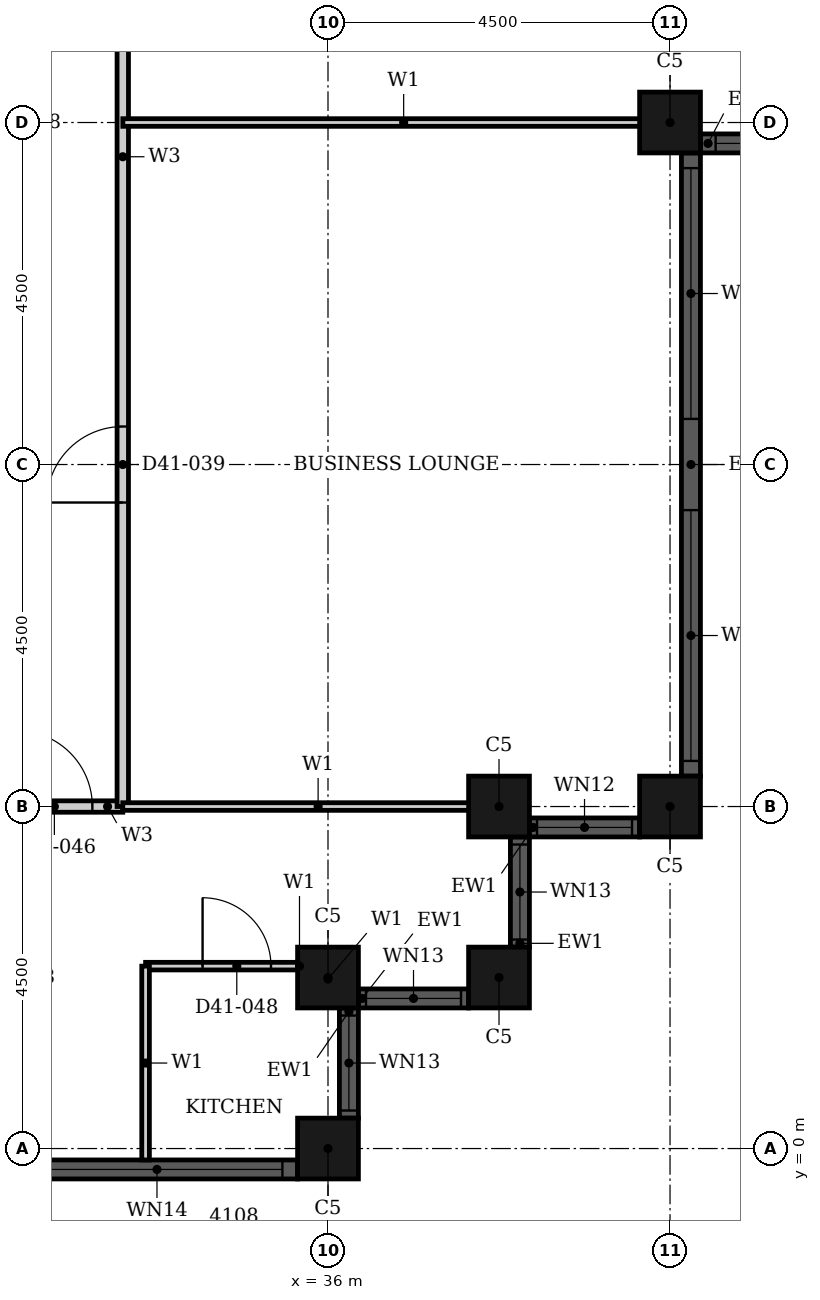
"""IFC4 building model, lengths in metres.
Left out: names, types, materials, properties, quantities, classifications, styles, units other than length and angle.
Written with IfcOpenShell. Run it as: python <this file> out.ifc"""

import sys

from ifc_helpers import new_model, si_unit, direction, frame, frame_2d, origin, origin_2d, place, context, subcontext, project, spatial, rectangle, hollow_rectangle, extrude, element, fill, save


model = new_model("IFC4")
c1 = context("Model", 3, precision=1e-05, world=origin(), true_north=direction((0.0, 1.0)))
c2 = subcontext(c1, "Body", "Model", "MODEL_VIEW")
j1 = project(units=[si_unit("LENGTHUNIT", "METRE"), si_unit("PLANEANGLEUNIT", "RADIAN")], contexts=[c1])
p1 = place(None, origin())
s1 = spatial("IfcSite", under=j1, at=p1, CompositionType="ELEMENT")
p2 = place(p1, origin())
s2 = spatial("IfcBuilding", under=s1, at=p2, CompositionType="ELEMENT")
p3 = place(p2, frame((0.0, 0.0, 165.4)))
s3 = spatial("IfcBuildingStorey", under=s2, at=p3, CompositionType="ELEMENT", Elevation=165.4)
for number, where, z_axis, x_axis in (
    (1, (36.0, 0.0, 0.0), (0.0, 0.0, 1.0), (1.0, 0.0, 0.0)),
    (2, (36.0, 2.25, 0.0), (0.0, 0.0, 1.0), (1.0, 0.0, 0.0)),
    (3, (38.25, 2.25, 0.0), (0.0, 0.0, 1.0), (1.0, 0.0, 0.0)),
    (4, (38.25, 4.5, 0.0), (0.0, 0.0, 1.0), (1.0, 0.0, 0.0)),
    (5, (40.5, 4.5, 0.0), (0.0, 0.0, 1.0), (1.0, 0.0, 0.0)),
    (6, (40.5, 13.5, 0.0), (0.0, 0.0, 1.0), (1.0, 0.0, 0.0)),
):
    element("IfcColumn", number, at=place(p3, frame(where, z_axis=z_axis, x_axis=x_axis)), inside=s3, PredefinedType="COLUMN", context=c2, shape_type="SweptSolid", body=[
        extrude(hollow_rectangle(XDim=0.8, YDim=0.8, WallThickness=0.025, at=origin_2d()), origin(), (0.0, 0.0, 1.0), 3.7),
    ])
p4 = place(p3, frame((27.4, -0.275, 0.0), z_axis=(0.0, 0.0, 1.0), x_axis=(1.0, 0.0, 0.0)))
e7 = element("IfcWall", 7, at=p4, inside=s3, PredefinedType="SOLIDWALL", context=c2, shape_type="SweptSolid", body=[
    extrude(rectangle(XDim=8.2, YDim=0.25, at=frame_2d((4.1, 0.0))), origin(), (0.0, 0.0, 1.0), 3.7),
])
p5 = place(p4, frame((0.2, 0.0, 0.45)))
e8 = element("IfcOpeningElement", 8, at=p5, cuts=e7, PredefinedType="OPENING", context=c2, shape_type="SweptSolid", body=[
    extrude(rectangle(XDim=3.3, YDim=2.53, at=frame_2d((1.65, 1.265))), frame((0.0, 0.135, 0.0), z_axis=(0.0, -1.0, 0.0), x_axis=(1.0, 0.0, 0.0)), (0.0, 0.0, 1.0), 0.27),
])
p6 = place(p4, frame((4.7, 0.0, 0.45)))
e9 = element("IfcOpeningElement", 9, at=p6, cuts=e7, PredefinedType="OPENING", context=c2, shape_type="SweptSolid", body=[
    extrude(rectangle(XDim=3.3, YDim=2.53, at=frame_2d((1.65, 1.265))), frame((0.0, 0.135, 0.0), z_axis=(0.0, -1.0, 0.0), x_axis=(1.0, 0.0, 0.0)), (0.0, 0.0, 1.0), 0.27),
])
p7 = place(p3, frame((36.275, 0.4, 0.0), z_axis=(0.0, 0.0, 1.0), x_axis=(0.0, 1.0, 0.0)))
e10 = element("IfcWall", 10, at=p7, inside=s3, PredefinedType="SOLIDWALL", context=c2, shape_type="SweptSolid", body=[
    extrude(rectangle(XDim=1.45, YDim=0.25, at=frame_2d((0.725, 0.0))), origin(), (0.0, 0.0, 1.0), 3.7),
])
p8 = place(p7, frame((0.1, 0.0, 0.9)))
e11 = element("IfcOpeningElement", 11, at=p8, cuts=e10, PredefinedType="OPENING", context=c2, shape_type="SweptSolid", body=[
    extrude(rectangle(XDim=1.25, YDim=1.85, at=frame_2d((0.625, 0.925))), frame((0.0, 0.135, 0.0), z_axis=(0.0, -1.0, 0.0), x_axis=(1.0, 0.0, 0.0)), (0.0, 0.0, 1.0), 0.27),
])
p9 = place(p3, frame((36.4, 1.975, 0.0), z_axis=(0.0, 0.0, 1.0), x_axis=(1.0, 0.0, 0.0)))
e12 = element("IfcWall", 12, at=p9, inside=s3, PredefinedType="SOLIDWALL", context=c2, shape_type="SweptSolid", body=[
    extrude(rectangle(XDim=1.45, YDim=0.25, at=frame_2d((0.725, 0.0))), origin(), (0.0, 0.0, 1.0), 3.7),
])
p10 = place(p9, frame((0.1, 0.0, 0.9)))
e13 = element("IfcOpeningElement", 13, at=p10, cuts=e12, PredefinedType="OPENING", context=c2, shape_type="SweptSolid", body=[
    extrude(rectangle(XDim=1.25, YDim=1.85, at=frame_2d((0.625, 0.925))), frame((0.0, 0.135, 0.0), z_axis=(0.0, -1.0, 0.0), x_axis=(1.0, 0.0, 0.0)), (0.0, 0.0, 1.0), 0.27),
])
p11 = place(p3, frame((38.525, 2.65, 0.0), z_axis=(0.0, 0.0, 1.0), x_axis=(0.0, 1.0, 0.0)))
e14 = element("IfcWall", 14, at=p11, inside=s3, PredefinedType="SOLIDWALL", context=c2, shape_type="SweptSolid", body=[
    extrude(rectangle(XDim=1.45, YDim=0.25, at=frame_2d((0.725, 0.0))), origin(), (0.0, 0.0, 1.0), 3.7),
])
p12 = place(p11, frame((0.1, 0.0, 0.9)))
e15 = element("IfcOpeningElement", 15, at=p12, cuts=e14, PredefinedType="OPENING", context=c2, shape_type="SweptSolid", body=[
    extrude(rectangle(XDim=1.25, YDim=1.85, at=frame_2d((0.625, 0.925))), frame((0.0, 0.135, 0.0), z_axis=(0.0, -1.0, 0.0), x_axis=(1.0, 0.0, 0.0)), (0.0, 0.0, 1.0), 0.27),
])
p13 = place(p3, frame((38.65, 4.225, 0.0), z_axis=(0.0, 0.0, 1.0), x_axis=(1.0, 0.0, 0.0)))
e16 = element("IfcWall", 16, at=p13, inside=s3, PredefinedType="SOLIDWALL", context=c2, shape_type="SweptSolid", body=[
    extrude(rectangle(XDim=1.45, YDim=0.25, at=frame_2d((0.725, 0.0))), origin(), (0.0, 0.0, 1.0), 3.7),
])
p14 = place(p13, frame((0.1, 0.0, 0.9)))
e17 = element("IfcOpeningElement", 17, at=p14, cuts=e16, PredefinedType="OPENING", context=c2, shape_type="SweptSolid", body=[
    extrude(rectangle(XDim=1.25, YDim=2.08, at=frame_2d((0.625, 1.04))), frame((0.0, 0.135, 0.0), z_axis=(0.0, -1.0, 0.0), x_axis=(1.0, 0.0, 0.0)), (0.0, 0.0, 1.0), 0.27),
])
p15 = place(p3, frame((40.775, 4.9, 0.0), z_axis=(0.0, 0.0, 1.0), x_axis=(0.0, 1.0, 0.0)))
e18 = element("IfcWall", 18, at=p15, inside=s3, PredefinedType="SOLIDWALL", context=c2, shape_type="SweptSolid", body=[
    extrude(rectangle(XDim=8.2, YDim=0.25, at=frame_2d((4.1, 0.0))), origin(), (0.0, 0.0, 1.0), 3.7),
])
p16 = place(p15, frame((0.2, 0.0, 0.45)))
e19 = element("IfcOpeningElement", 19, at=p16, cuts=e18, PredefinedType="OPENING", context=c2, shape_type="SweptSolid", body=[
    extrude(rectangle(XDim=3.3, YDim=2.3, at=frame_2d((1.65, 1.15))), frame((0.0, 0.135, 0.0), z_axis=(0.0, -1.0, 0.0), x_axis=(1.0, 0.0, 0.0)), (0.0, 0.0, 1.0), 0.27),
])
p17 = place(p15, frame((4.7, 0.0, 0.45)))
e20 = element("IfcOpeningElement", 20, at=p17, cuts=e18, PredefinedType="OPENING", context=c2, shape_type="SweptSolid", body=[
    extrude(rectangle(XDim=3.3, YDim=2.3, at=frame_2d((1.65, 1.15))), frame((0.0, 0.135, 0.0), z_axis=(0.0, -1.0, 0.0), x_axis=(1.0, 0.0, 0.0)), (0.0, 0.0, 1.0), 0.27),
])
p18 = place(p3, frame((40.9, 13.225, 0.0), z_axis=(0.0, 0.0, 1.0), x_axis=(1.0, 0.0, 0.0)))
e21 = element("IfcWall", 21, at=p18, inside=s3, PredefinedType="SOLIDWALL", context=c2, shape_type="SweptSolid", body=[
    extrude(rectangle(XDim=3.7, YDim=0.25, at=frame_2d((1.85, 0.0))), origin(), (0.0, 0.0, 1.0), 3.7),
])
p19 = place(p18, frame((0.2, 0.0, 0.45)))
e22 = element("IfcOpeningElement", 22, at=p19, cuts=e21, PredefinedType="OPENING", context=c2, shape_type="SweptSolid", body=[
    extrude(rectangle(XDim=3.3, YDim=2.3, at=frame_2d((1.65, 1.15))), frame((0.0, 0.135, 0.0), z_axis=(0.0, -1.0, 0.0), x_axis=(1.0, 0.0, 0.0)), (0.0, 0.0, 1.0), 0.27),
])
p20 = place(p3, frame((31.5, 4.5, 0.0), z_axis=(0.0, 0.0, 1.0), x_axis=(1.0, 0.0, 0.0)))
e23 = element("IfcWall", 23, at=p20, inside=s3, PredefinedType="PARTITIONING", context=c2, shape_type="SweptSolid", body=[
    extrude(rectangle(XDim=1.8, YDim=0.15, at=frame_2d((0.9, 0.0))), origin(), (0.0, 0.0, 1.0), 3.4),
])
p21 = place(p20, frame((0.4, 0.0, 0.0)))
e24 = element("IfcOpeningElement", 24, at=p21, cuts=e23, PredefinedType="OPENING", context=c2, shape_type="SweptSolid", body=[
    extrude(rectangle(XDim=1.0, YDim=2.2, at=frame_2d((0.5, 1.1))), frame((0.0, 0.085, 0.0), z_axis=(0.0, -1.0, 0.0), x_axis=(1.0, 0.0, 0.0)), (0.0, 0.0, 1.0), 0.17),
])
p22 = place(p3, frame((33.3, 4.5, 0.0), z_axis=(0.0, 0.0, 1.0), x_axis=(0.0, 1.0, 0.0)))
e25 = element("IfcWall", 25, at=p22, inside=s3, PredefinedType="PARTITIONING", context=c2, shape_type="SweptSolid", body=[
    extrude(rectangle(XDim=16.199, YDim=0.15, at=frame_2d((8.1, 0.0))), origin(), (0.0, 0.0, 1.0), 3.4),
])
p23 = place(p22, frame((12.099, 0.0, 0.0)))
e26 = element("IfcOpeningElement", 26, at=p23, cuts=e25, PredefinedType="OPENING", context=c2, shape_type="SweptSolid", body=[
    extrude(rectangle(XDim=1.0, YDim=2.2, at=frame_2d((0.5, 1.1))), frame((0.0, 0.085, 0.0), z_axis=(0.0, -1.0, 0.0), x_axis=(1.0, 0.0, 0.0)), (0.0, 0.0, 1.0), 0.17),
])
p24 = place(p22, frame((4.0, 0.0, 0.0)))
e27 = element("IfcOpeningElement", 27, at=p24, cuts=e25, PredefinedType="OPENING", context=c2, shape_type="SweptSolid", body=[
    extrude(rectangle(XDim=1.0, YDim=2.1, at=frame_2d((0.5, 1.05))), frame((0.0, 0.085, 0.0), z_axis=(0.0, -1.0, 0.0), x_axis=(1.0, 0.0, 0.0)), (0.0, 0.0, 1.0), 0.17),
])
p25 = place(p3, frame((33.301, 13.5, 0.0), z_axis=(0.0, 0.0, 1.0), x_axis=(1.0, 0.0, 0.0)))
e28 = element("IfcWall", 28, at=p25, inside=s3, PredefinedType="PARTITIONING", context=c2, shape_type="SweptSolid", body=[
    extrude(rectangle(XDim=7.389, YDim=0.1, at=frame_2d((3.694, 0.0))), origin(), (0.0, 0.0, 1.0), 2.48),
])
p26 = place(p3, frame((33.6, 2.4, 0.0), z_axis=(0.0, 0.0, 1.0), x_axis=(1.0, 0.0, 0.0)))
e29 = element("IfcWall", 29, at=p26, inside=s3, PredefinedType="PARTITIONING", context=c2, shape_type="SweptSolid", body=[
    extrude(rectangle(XDim=2.4, YDim=0.1, at=frame_2d((1.2, 0.0))), origin(), (0.0, 0.0, 1.0), 3.4),
])
p27 = place(p26, frame((0.75, 0.0, 0.0)))
e30 = element("IfcOpeningElement", 30, at=p27, cuts=e29, PredefinedType="OPENING", context=c2, shape_type="SweptSolid", body=[
    extrude(rectangle(XDim=0.9, YDim=2.1, at=frame_2d((0.45, 1.05))), frame((0.0, 0.06, 0.0), z_axis=(0.0, -1.0, 0.0), x_axis=(1.0, 0.0, 0.0)), (0.0, 0.0, 1.0), 0.12),
])
p28 = place(p3, frame((33.3, 4.5, 0.0), z_axis=(0.0, 0.0, 1.0), x_axis=(1.0, 0.0, 0.0)))
e31 = element("IfcWall", 31, at=p28, inside=s3, PredefinedType="PARTITIONING", context=c2, shape_type="SweptSolid", body=[
    extrude(rectangle(XDim=5.14, YDim=0.1, at=frame_2d((2.57, 0.0))), origin(), (0.0, 0.0, 1.0), 3.4),
])
p29 = place(p3, frame((33.6, -0.15, 0.0), z_axis=(0.0, 0.0, 1.0), x_axis=(0.0, 1.0, 0.0)))
e32 = element("IfcWall", 32, at=p29, inside=s3, PredefinedType="PARTITIONING", context=c2, shape_type="SweptSolid", body=[
    extrude(rectangle(XDim=2.55, YDim=0.1, at=frame_2d((1.275, 0.0))), origin(), (0.0, 0.0, 1.0), 3.4),
])
p30 = place(p3, frame((36.0, 2.06, 0.0), z_axis=(0.0, 0.0, 1.0), x_axis=(0.0, 1.0, 0.0)))
e33 = element("IfcWall", 33, at=p30, inside=s3, PredefinedType="PARTITIONING", context=c2, shape_type="SweptSolid", body=[
    extrude(rectangle(XDim=0.34, YDim=0.1, at=frame_2d((0.17, 0.0))), origin(), (0.0, 0.0, 1.0), 3.4),
])
p31 = place(p6, origin())
e34 = element("IfcWindow", 34, at=p31, inside=s3, PartitioningType="SINGLE_PANEL", PredefinedType="WINDOW", context=c2, shape_type="SweptSolid", body=[
    extrude(rectangle(XDim=3.3, YDim=2.53, at=frame_2d((1.65, 1.265))), frame((0.0, 0.03, 0.0), z_axis=(0.0, -1.0, 0.0), x_axis=(1.0, 0.0, 0.0)), (0.0, 0.0, 1.0), 0.06),
])
fill(e9, e34)
p32 = place(p8, origin())
e35 = element("IfcWindow", 35, at=p32, inside=s3, PartitioningType="SINGLE_PANEL", PredefinedType="WINDOW", context=c2, shape_type="SweptSolid", body=[
    extrude(rectangle(XDim=1.25, YDim=1.85, at=frame_2d((0.625, 0.925))), frame((0.0, 0.03, 0.0), z_axis=(0.0, -1.0, 0.0), x_axis=(1.0, 0.0, 0.0)), (0.0, 0.0, 1.0), 0.06),
])
fill(e11, e35)
p33 = place(p10, origin())
e36 = element("IfcWindow", 36, at=p33, inside=s3, PartitioningType="SINGLE_PANEL", PredefinedType="WINDOW", context=c2, shape_type="SweptSolid", body=[
    extrude(rectangle(XDim=1.25, YDim=1.85, at=frame_2d((0.625, 0.925))), frame((0.0, 0.03, 0.0), z_axis=(0.0, -1.0, 0.0), x_axis=(1.0, 0.0, 0.0)), (0.0, 0.0, 1.0), 0.06),
])
fill(e13, e36)
p34 = place(p12, origin())
e37 = element("IfcWindow", 37, at=p34, inside=s3, PartitioningType="SINGLE_PANEL", PredefinedType="WINDOW", context=c2, shape_type="SweptSolid", body=[
    extrude(rectangle(XDim=1.25, YDim=1.85, at=frame_2d((0.625, 0.925))), frame((0.0, 0.03, 0.0), z_axis=(0.0, -1.0, 0.0), x_axis=(1.0, 0.0, 0.0)), (0.0, 0.0, 1.0), 0.06),
])
fill(e15, e37)
p35 = place(p14, origin())
e38 = element("IfcWindow", 38, at=p35, inside=s3, PartitioningType="SINGLE_PANEL", PredefinedType="WINDOW", context=c2, shape_type="SweptSolid", body=[
    extrude(rectangle(XDim=1.25, YDim=2.08, at=frame_2d((0.625, 1.04))), frame((0.0, 0.03, 0.0), z_axis=(0.0, -1.0, 0.0), x_axis=(1.0, 0.0, 0.0)), (0.0, 0.0, 1.0), 0.06),
])
fill(e17, e38)
p36 = place(p16, origin())
e39 = element("IfcWindow", 39, at=p36, inside=s3, PartitioningType="SINGLE_PANEL", PredefinedType="WINDOW", context=c2, shape_type="SweptSolid", body=[
    extrude(rectangle(XDim=3.3, YDim=2.3, at=frame_2d((1.65, 1.15))), frame((0.0, 0.03, 0.0), z_axis=(0.0, -1.0, 0.0), x_axis=(1.0, 0.0, 0.0)), (0.0, 0.0, 1.0), 0.06),
])
fill(e19, e39)
p37 = place(p17, origin())
e40 = element("IfcWindow", 40, at=p37, inside=s3, PartitioningType="SINGLE_PANEL", PredefinedType="WINDOW", context=c2, shape_type="SweptSolid", body=[
    extrude(rectangle(XDim=3.3, YDim=2.3, at=frame_2d((1.65, 1.15))), frame((0.0, 0.03, 0.0), z_axis=(0.0, -1.0, 0.0), x_axis=(1.0, 0.0, 0.0)), (0.0, 0.0, 1.0), 0.06),
])
fill(e20, e40)
p38 = place(p19, origin())
e41 = element("IfcWindow", 41, at=p38, inside=s3, PartitioningType="SINGLE_PANEL", PredefinedType="WINDOW", context=c2, shape_type="SweptSolid", body=[
    extrude(rectangle(XDim=3.3, YDim=2.3, at=frame_2d((1.65, 1.15))), frame((0.0, 0.03, 0.0), z_axis=(0.0, -1.0, 0.0), x_axis=(1.0, 0.0, 0.0)), (0.0, 0.0, 1.0), 0.06),
])
fill(e22, e41)
p39 = place(p24, origin())
e42 = element("IfcDoor", 42, at=p39, inside=s3, OperationType="SINGLE_SWING_LEFT", PredefinedType="DOOR", context=c2, shape_type="SweptSolid", body=[
    extrude(rectangle(XDim=1.0, YDim=2.1, at=frame_2d((0.5, 1.05))), frame((0.0, 0.025, 0.0), z_axis=(0.0, -1.0, 0.0), x_axis=(1.0, 0.0, 0.0)), (0.0, 0.0, 1.0), 0.05),
])
fill(e27, e42)
p40 = place(p21, origin())
e43 = element("IfcDoor", 43, at=p40, inside=s3, OperationType="SINGLE_SWING_LEFT", PredefinedType="DOOR", context=c2, shape_type="SweptSolid", body=[
    extrude(rectangle(XDim=1.0, YDim=2.2, at=frame_2d((0.5, 1.1))), frame((0.0, 0.025, 0.0), z_axis=(0.0, -1.0, 0.0), x_axis=(1.0, 0.0, 0.0)), (0.0, 0.0, 1.0), 0.05),
])
fill(e24, e43)
p41 = place(p27, origin())
e44 = element("IfcDoor", 44, at=p41, inside=s3, OperationType="SINGLE_SWING_LEFT", PredefinedType="DOOR", context=c2, shape_type="SweptSolid", body=[
    extrude(rectangle(XDim=0.9, YDim=2.1, at=frame_2d((0.45, 1.05))), frame((0.0, 0.025, 0.0), z_axis=(0.0, -1.0, 0.0), x_axis=(1.0, 0.0, 0.0)), (0.0, 0.0, 1.0), 0.05),
])
fill(e30, e44)
save(model, sys.argv[1])
